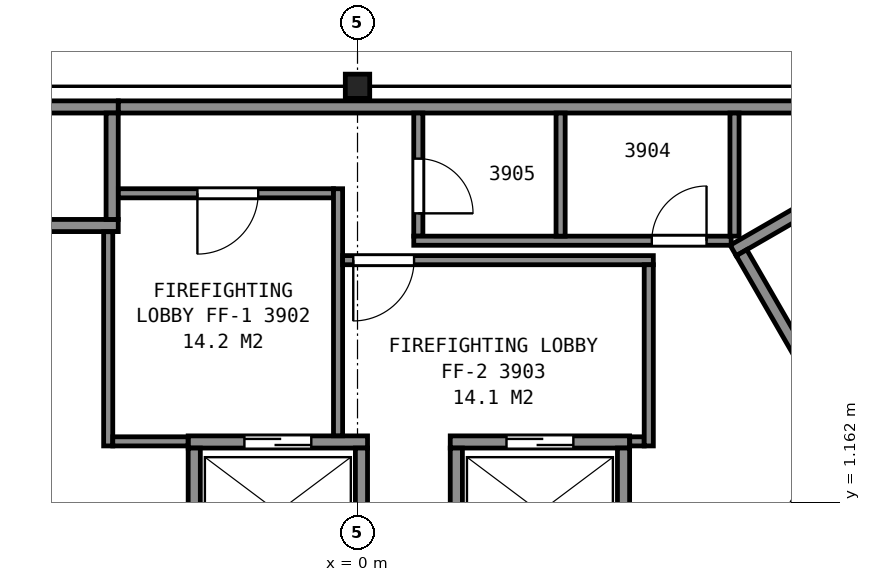
"""IFC4 building model, lengths in metres.
Left out: names, types, materials, properties, quantities, classifications, styles, units other than length and angle.
Written with IfcOpenShell. Run it as: python <this file> out.ifc"""

import sys

from ifc_helpers import new_model, si_unit, direction, frame, frame_2d, origin, origin_2d, place, context, subcontext, project, spatial, rectangle, i_section, extrude, element, fill, save


model = new_model("IFC4")
c1 = context("Model", 3, precision=1e-05, world=origin(), true_north=direction((0.0, 1.0)))
c2 = subcontext(c1, "Body", "Model", "MODEL_VIEW")
j1 = project(units=[si_unit("LENGTHUNIT", "METRE"), si_unit("PLANEANGLEUNIT", "RADIAN")], contexts=[c1])
p1 = place(None, origin())
s1 = spatial("IfcSite", under=j1, at=p1, CompositionType="ELEMENT")
p2 = place(p1, origin())
s2 = spatial("IfcBuilding", under=s1, at=p2, CompositionType="ELEMENT")
p3 = place(p2, frame((0.0, 0.0, 159.9)))
s3 = spatial("IfcBuildingStorey", under=s2, at=p3, CompositionType="ELEMENT", Elevation=159.9)
p4 = place(p3, frame((0.0, 8.0, 0.0), z_axis=(0.0, 0.0, 1.0), x_axis=(1.0, 0.0, 0.0)))
e1 = element("IfcColumn", 1, at=p4, inside=s3, PredefinedType="COLUMN", context=c2, shape_type="SweptSolid", body=[
    extrude(i_section(OverallWidth=0.401, OverallDepth=0.399, WebThickness=0.025, FlangeThickness=0.04, FilletRadius=0.015, at=origin_2d()), origin(), (0.0, 0.0, 1.0), 3.7),
])
p5 = place(p3, frame((6.178, 5.299, 0.0), z_axis=(0.0, 0.0, 1.0), x_axis=(0.866019993635, 0.500009370536, 0.0)))
e2 = element("IfcWall", 2, at=p5, inside=s3, PredefinedType="PARTITIONING", context=c2, shape_type="SweptSolid", body=[
    extrude(rectangle(XDim=9.6, YDim=0.2, at=frame_2d((4.8, 0.0))), origin(), (0.0, 0.0, 1.0), 3.45),
])
p6 = place(p3, frame((7.715, 2.838, 0.0), z_axis=(0.0, 0.0, 1.0), x_axis=(-0.500049511043, 0.865996816683, 0.0)))
e3 = element("IfcWall", 3, at=p6, inside=s3, PredefinedType="PARTITIONING", context=c2, shape_type="SweptSolid", body=[
    extrude(rectangle(XDim=2.8, YDim=0.2, at=frame_2d((1.4, 0.0))), origin(), (0.0, 0.0, 1.0), 3.45),
])
p7 = place(p3, frame((-2.785, 2.15, 0.0), z_axis=(0.0, 0.0, 1.0), x_axis=(1.0, 0.0, 0.0)))
e4 = element("IfcWall", 4, at=p7, inside=s3, PredefinedType="PARTITIONING", context=c2, shape_type="SweptSolid", body=[
    extrude(rectangle(XDim=2.95, YDim=0.2, at=frame_2d((1.475, 0.0))), origin(), (0.0, 0.0, 1.0), 3.7),
])
p8 = place(p7, frame((0.925, 0.0, 0.0)))
e5 = element("IfcOpeningElement", 5, at=p8, cuts=e4, PredefinedType="OPENING", context=c2, shape_type="SweptSolid", body=[
    extrude(rectangle(XDim=1.1, YDim=2.1, at=frame_2d((0.55, 1.05))), frame((0.0, 0.11, 0.0), z_axis=(0.0, -1.0, 0.0), x_axis=(1.0, 0.0, 0.0)), (0.0, 0.0, 1.0), 0.22),
])
p9 = place(p3, frame((1.525, 2.15, 0.0), z_axis=(0.0, 0.0, 1.0), x_axis=(1.0, 0.0, 0.0)))
e6 = element("IfcWall", 6, at=p9, inside=s3, PredefinedType="PARTITIONING", context=c2, shape_type="SweptSolid", body=[
    extrude(rectangle(XDim=2.95, YDim=0.2, at=frame_2d((1.475, 0.0))), origin(), (0.0, 0.0, 1.0), 3.7),
])
p10 = place(p9, frame((0.925, 0.0, 0.0)))
e7 = element("IfcOpeningElement", 7, at=p10, cuts=e6, PredefinedType="OPENING", context=c2, shape_type="SweptSolid", body=[
    extrude(rectangle(XDim=1.1, YDim=2.1, at=frame_2d((0.55, 1.05))), frame((0.0, 0.11, 0.0), z_axis=(0.0, -1.0, 0.0), x_axis=(1.0, 0.0, 0.0)), (0.0, 0.0, 1.0), 0.22),
])
for number, where, z_axis, x_axis in (
    (8, (-6.285, 5.71, 0.0), (0.0, 0.0, 1.0), (1.0, 0.0, 0.0)),
    (9, (-6.285, 7.66, 0.0), (0.0, 0.0, 1.0), (1.0, 0.0, 0.0)),
):
    element("IfcWall", number, at=place(p3, frame(where, z_axis=z_axis, x_axis=x_axis)), inside=s3, PredefinedType="PARTITIONING", context=c2, shape_type="SweptSolid", body=[
        extrude(rectangle(XDim=2.35, YDim=0.2, at=frame_2d((1.175, 0.0))), origin(), (0.0, 0.0, 1.0), 3.7),
    ])
p11 = place(p3, frame((5.663, -1.612, 0.0), z_axis=(0.0, 0.0, 1.0), x_axis=(0.49998122708, 0.866036242063, 0.0)))
e10 = element("IfcWall", 10, at=p11, inside=s3, PredefinedType="PARTITIONING", context=c2, shape_type="SweptSolid", body=[
    extrude(rectangle(XDim=4.9, YDim=0.2, at=frame_2d((2.45, 0.0))), origin(), (0.0, 0.0, 1.0), 3.7),
])
for number, where, z_axis, x_axis in (
    (11, (4.375, 0.1, 0.0), (0.0, 0.0, 1.0), (0.0, 1.0, 0.0)),
    (12, (1.625, 0.1, 0.0), (0.0, 0.0, 1.0), (0.0, 1.0, 0.0)),
    (13, (0.065, 0.1, 0.0), (0.0, 0.0, 1.0), (0.0, 1.0, 0.0)),
    (14, (-2.685, 0.1, 0.0), (0.0, 0.0, 1.0), (0.0, 1.0, 0.0)),
):
    element("IfcWall", number, at=place(p3, frame(where, z_axis=z_axis, x_axis=x_axis)), inside=s3, PredefinedType="PARTITIONING", context=c2, shape_type="SweptSolid", body=[
        extrude(rectangle(XDim=1.95, YDim=0.2, at=frame_2d((0.975, 0.0))), origin(), (0.0, 0.0, 1.0), 3.7),
    ])
p12 = place(p3, frame((-4.035, 5.81, 0.0), z_axis=(0.0, 0.0, 1.0), x_axis=(0.0, 1.0, 0.0)))
e15 = element("IfcWall", 15, at=p12, inside=s3, PredefinedType="PARTITIONING", context=c2, shape_type="SweptSolid", body=[
    extrude(rectangle(XDim=1.75, YDim=0.2, at=frame_2d((0.875, 0.0))), origin(), (0.0, 0.0, 1.0), 3.7),
])
p13 = place(p3, frame((-4.1, 2.085, 0.0), z_axis=(0.0, 0.0, 1.0), x_axis=(0.0, 1.0, 0.0)))
e16 = element("IfcWall", 16, at=p13, inside=s3, PredefinedType="PARTITIONING", context=c2, shape_type="SweptSolid", body=[
    extrude(rectangle(XDim=3.523, YDim=0.15, at=frame_2d((1.761, 0.0))), origin(), (0.0, 0.0, 1.0), 3.45),
])
p14 = place(p3, frame((-4.025, 2.16, 0.0), z_axis=(0.0, 0.0, 1.0), x_axis=(1.0, 0.0, 0.0)))
e17 = element("IfcWall", 17, at=p14, inside=s3, PredefinedType="PARTITIONING", context=c2, shape_type="SweptSolid", body=[
    extrude(rectangle(XDim=1.238, YDim=0.15, at=frame_2d((0.619, 0.0))), origin(), (0.0, 0.0, 1.0), 3.45),
])
p15 = place(p3, frame((-3.933, 6.24, 0.0), z_axis=(0.0, 0.0, 1.0), x_axis=(1.0, 0.0, 0.0)))
e18 = element("IfcWall", 18, at=p15, inside=s3, PredefinedType="PARTITIONING", context=c2, shape_type="SweptSolid", body=[
    extrude(rectangle(XDim=3.538, YDim=0.15, at=frame_2d((1.769, 0.0))), origin(), (0.0, 0.0, 1.0), 3.45),
])
p16 = place(p15, frame((1.3, 0.0, 0.0)))
e19 = element("IfcOpeningElement", 19, at=p16, cuts=e18, PredefinedType="OPENING", context=c2, shape_type="SweptSolid", body=[
    extrude(rectangle(XDim=1.0, YDim=2.1, at=frame_2d((0.5, 1.05))), frame((0.0, 0.085, 0.0), z_axis=(0.0, -1.0, 0.0), x_axis=(1.0, 0.0, 0.0)), (0.0, 0.0, 1.0), 0.17),
])
p17 = place(p3, frame((-3.933, 7.66, 0.0), z_axis=(0.0, 0.0, 1.0), x_axis=(1.0, 0.0, 0.0)))
e20 = element("IfcWall", 20, at=p17, inside=s3, PredefinedType="PARTITIONING", context=c2, shape_type="SweptSolid", body=[
    extrude(rectangle(XDim=13.841, YDim=0.2, at=frame_2d((6.92, 0.0))), origin(), (0.0, 0.0, 1.0), 3.45),
])
p18 = place(p3, frame((-0.32, 2.252, 0.0), z_axis=(0.0, 0.0, 1.0), x_axis=(0.0, 1.0, 0.0)))
e21 = element("IfcWall", 21, at=p18, inside=s3, PredefinedType="PARTITIONING", context=c2, shape_type="SweptSolid", body=[
    extrude(rectangle(XDim=4.063, YDim=0.15, at=frame_2d((2.031, 0.0))), origin(), (0.0, 0.0, 1.0), 3.45),
])
p19 = place(p3, frame((-0.245, 5.14, 0.0), z_axis=(0.0, 0.0, 1.0), x_axis=(1.0, 0.0, 0.0)))
e22 = element("IfcWall", 22, at=p19, inside=s3, PredefinedType="PARTITIONING", context=c2, shape_type="SweptSolid", body=[
    extrude(rectangle(XDim=5.11, YDim=0.15, at=frame_2d((2.555, 0.0))), origin(), (0.0, 0.0, 1.0), 3.45),
])
p20 = place(p19, frame((0.175, 0.0, 0.0)))
e23 = element("IfcOpeningElement", 23, at=p20, cuts=e22, PredefinedType="OPENING", context=c2, shape_type="SweptSolid", body=[
    extrude(rectangle(XDim=1.0, YDim=2.1, at=frame_2d((0.5, 1.05))), frame((0.0, 0.085, 0.0), z_axis=(0.0, -1.0, 0.0), x_axis=(1.0, 0.0, 0.0)), (0.0, 0.0, 1.0), 0.17),
])
p21 = place(p3, frame((1.0, 7.56, 0.0), z_axis=(0.0, 0.0, 1.0), x_axis=(0.0, -1.0, 0.0)))
e24 = element("IfcWall", 24, at=p21, inside=s3, PredefinedType="PARTITIONING", context=c2, shape_type="SweptSolid", body=[
    extrude(rectangle(XDim=2.025, YDim=0.15, at=frame_2d((1.013, 0.0))), origin(), (0.0, 0.0, 1.0), 3.45),
])
p22 = place(p21, frame((0.75, 0.0, 0.0)))
e25 = element("IfcOpeningElement", 25, at=p22, cuts=e24, PredefinedType="OPENING", context=c2, shape_type="SweptSolid", body=[
    extrude(rectangle(XDim=0.9, YDim=2.1, at=frame_2d((0.45, 1.05))), frame((0.0, 0.085, 0.0), z_axis=(0.0, -1.0, 0.0), x_axis=(1.0, 0.0, 0.0)), (0.0, 0.0, 1.0), 0.17),
])
p23 = place(p3, frame((0.925, 5.46, 0.0), z_axis=(0.0, 0.0, 1.0), x_axis=(1.0, 0.0, 0.0)))
e26 = element("IfcWall", 26, at=p23, inside=s3, PredefinedType="PARTITIONING", context=c2, shape_type="SweptSolid", body=[
    extrude(rectangle(XDim=5.22, YDim=0.15, at=frame_2d((2.61, 0.0))), origin(), (0.0, 0.0, 1.0), 3.45),
])
p24 = place(p23, frame((3.915, 0.0, 0.0)))
e27 = element("IfcOpeningElement", 27, at=p24, cuts=e26, PredefinedType="OPENING", context=c2, shape_type="SweptSolid", body=[
    extrude(rectangle(XDim=0.9, YDim=2.1, at=frame_2d((0.45, 1.05))), frame((0.0, 0.085, 0.0), z_axis=(0.0, -1.0, 0.0), x_axis=(1.0, 0.0, 0.0)), (0.0, 0.0, 1.0), 0.17),
])
p25 = place(p3, frame((3.34, 5.535, 0.0), z_axis=(0.0, 0.0, 1.0), x_axis=(0.0, 1.0, 0.0)))
e28 = element("IfcWall", 28, at=p25, inside=s3, PredefinedType="PARTITIONING", context=c2, shape_type="SweptSolid", body=[
    extrude(rectangle(XDim=2.025, YDim=0.15, at=frame_2d((1.013, 0.0))), origin(), (0.0, 0.0, 1.0), 3.45),
])
p26 = place(p3, frame((4.477, 2.16, 0.0), z_axis=(0.0, 0.0, 1.0), x_axis=(1.0, 0.0, 0.0)))
e29 = element("IfcWall", 29, at=p26, inside=s3, PredefinedType="PARTITIONING", context=c2, shape_type="SweptSolid", body=[
    extrude(rectangle(XDim=0.238, YDim=0.15, at=frame_2d((0.119, 0.0))), origin(), (0.0, 0.0, 1.0), 3.45),
])
p27 = place(p3, frame((4.79, 2.085, 0.0), z_axis=(0.0, 0.0, 1.0), x_axis=(0.0, 1.0, 0.0)))
e30 = element("IfcWall", 30, at=p27, inside=s3, PredefinedType="PARTITIONING", context=c2, shape_type="SweptSolid", body=[
    extrude(rectangle(XDim=2.98, YDim=0.15, at=frame_2d((1.49, 0.0))), origin(), (0.0, 0.0, 1.0), 3.45),
])
p28 = place(p3, frame((6.2, 5.535, 0.0), z_axis=(0.0, 0.0, 1.0), x_axis=(0.0, 1.0, 0.0)))
e31 = element("IfcWall", 31, at=p28, inside=s3, PredefinedType="PARTITIONING", context=c2, shape_type="SweptSolid", body=[
    extrude(rectangle(XDim=2.025, YDim=0.15, at=frame_2d((1.013, 0.0))), origin(), (0.0, 0.0, 1.0), 3.45),
])
p29 = place(p3, frame((-4.675, -12.706, 0.0), z_axis=(0.0, 0.0, 1.0), x_axis=(-0.499972470324, 0.866041297467, 0.0)))
e32 = element("IfcWall", 32, at=p29, inside=s3, PredefinedType="PARTITIONING", context=c2, shape_type="SweptSolid", body=[
    extrude(rectangle(XDim=17.385, YDim=0.2, at=frame_2d((8.692, 0.0))), origin(), (0.0, 0.0, 1.0), 2.713),
])
p30 = place(p29, frame((15.435, 0.0, 0.0)))
e33 = element("IfcOpeningElement", 33, at=p30, cuts=e32, PredefinedType="OPENING", context=c2, shape_type="SweptSolid", body=[
    extrude(rectangle(XDim=0.9, YDim=2.1, at=frame_2d((0.45, 1.05))), frame((0.0, 0.11, 0.0), z_axis=(0.0, -1.0, 0.0), x_axis=(1.0, 0.0, 0.0)), (0.0, 0.0, 1.0), 0.22),
])
p31 = place(p29, frame((12.835, 0.0, 0.0)))
e34 = element("IfcOpeningElement", 34, at=p31, cuts=e32, PredefinedType="OPENING", context=c2, shape_type="SweptSolid", body=[
    extrude(rectangle(XDim=0.9, YDim=2.1, at=frame_2d((0.45, 1.05))), frame((0.0, 0.11, 0.0), z_axis=(0.0, -1.0, 0.0), x_axis=(1.0, 0.0, 0.0)), (0.0, 0.0, 1.0), 0.22),
])
p32 = place(p29, frame((6.941, 0.0, 0.0)))
e35 = element("IfcOpeningElement", 35, at=p32, cuts=e32, PredefinedType="OPENING", context=c2, shape_type="SweptSolid", body=[
    extrude(rectangle(XDim=0.9, YDim=2.1, at=frame_2d((0.45, 1.05))), frame((0.0, 0.11, 0.0), z_axis=(0.0, -1.0, 0.0), x_axis=(1.0, 0.0, 0.0)), (0.0, 0.0, 1.0), 0.22),
])
p33 = place(p29, frame((2.028, 0.0, 0.0)))
e36 = element("IfcOpeningElement", 36, at=p33, cuts=e32, PredefinedType="OPENING", context=c2, shape_type="SweptSolid", body=[
    extrude(rectangle(XDim=0.9, YDim=2.1, at=frame_2d((0.45, 1.05))), frame((0.0, 0.11, 0.0), z_axis=(0.0, -1.0, 0.0), x_axis=(1.0, 0.0, 0.0)), (0.0, 0.0, 1.0), 0.22),
])
p34 = place(p3, frame((13.342, 2.306, 0.0), z_axis=(0.0, 0.0, 1.0), x_axis=(-0.49997635812, -0.866039053, 0.0)))
e37 = element("IfcWall", 37, at=p34, inside=s3, PredefinedType="PARTITIONING", context=c2, shape_type="SweptSolid", body=[
    extrude(rectangle(XDim=17.285, YDim=0.1, at=frame_2d((8.643, 0.0))), origin(), (0.0, 0.0, 1.0), 2.713),
])
p35 = place(p34, frame((15.585, 0.0, 0.0)))
e38 = element("IfcOpeningElement", 38, at=p35, cuts=e37, PredefinedType="OPENING", context=c2, shape_type="SweptSolid", body=[
    extrude(rectangle(XDim=0.9, YDim=2.1, at=frame_2d((0.45, 1.05))), frame((0.0, 0.06, 0.0), z_axis=(0.0, -1.0, 0.0), x_axis=(1.0, 0.0, 0.0)), (0.0, 0.0, 1.0), 0.12),
])
p36 = place(p34, frame((11.595, 0.0, 0.0)))
e39 = element("IfcOpeningElement", 39, at=p36, cuts=e37, PredefinedType="OPENING", context=c2, shape_type="SweptSolid", body=[
    extrude(rectangle(XDim=0.9, YDim=2.1, at=frame_2d((0.45, 1.05))), frame((0.0, 0.06, 0.0), z_axis=(0.0, -1.0, 0.0), x_axis=(1.0, 0.0, 0.0)), (0.0, 0.0, 1.0), 0.12),
])
p37 = place(p34, frame((6.171, 0.0, 0.0)))
e40 = element("IfcOpeningElement", 40, at=p37, cuts=e37, PredefinedType="OPENING", context=c2, shape_type="SweptSolid", body=[
    extrude(rectangle(XDim=0.9, YDim=2.1, at=frame_2d((0.45, 1.05))), frame((0.0, 0.06, 0.0), z_axis=(0.0, -1.0, 0.0), x_axis=(1.0, 0.0, 0.0)), (0.0, 0.0, 1.0), 0.12),
])
p38 = place(p8, origin())
e41 = element("IfcDoor", 41, at=p38, inside=s3, OperationType="SLIDING_TO_LEFT", PredefinedType="DOOR", context=c2, shape_type="SweptSolid", body=[
    extrude(rectangle(XDim=1.1, YDim=2.1, at=frame_2d((0.55, 1.05))), frame((0.0, 0.025, 0.0), z_axis=(0.0, -1.0, 0.0), x_axis=(1.0, 0.0, 0.0)), (0.0, 0.0, 1.0), 0.05),
])
fill(e5, e41)
p39 = place(p10, origin())
e42 = element("IfcDoor", 42, at=p39, inside=s3, OperationType="SLIDING_TO_RIGHT", PredefinedType="DOOR", context=c2, shape_type="SweptSolid", body=[
    extrude(rectangle(XDim=1.1, YDim=2.1, at=frame_2d((0.55, 1.05))), frame((0.0, 0.025, 0.0), z_axis=(0.0, -1.0, 0.0), x_axis=(1.0, 0.0, 0.0)), (0.0, 0.0, 1.0), 0.05),
])
fill(e7, e42)
p40 = place(p16, origin())
e43 = element("IfcDoor", 43, at=p40, inside=s3, OperationType="SINGLE_SWING_LEFT", PredefinedType="DOOR", context=c2, shape_type="SweptSolid", body=[
    extrude(rectangle(XDim=1.0, YDim=2.1, at=frame_2d((0.5, 1.05))), frame((0.0, 0.025, 0.0), z_axis=(0.0, -1.0, 0.0), x_axis=(1.0, 0.0, 0.0)), (0.0, 0.0, 1.0), 0.05),
])
fill(e19, e43)
p41 = place(p20, origin())
e44 = element("IfcDoor", 44, at=p41, inside=s3, OperationType="SINGLE_SWING_LEFT", PredefinedType="DOOR", context=c2, shape_type="SweptSolid", body=[
    extrude(rectangle(XDim=1.0, YDim=2.1, at=frame_2d((0.5, 1.05))), frame((0.0, 0.025, 0.0), z_axis=(0.0, -1.0, 0.0), x_axis=(1.0, 0.0, 0.0)), (0.0, 0.0, 1.0), 0.05),
])
fill(e23, e44)
p42 = place(p22, origin())
e45 = element("IfcDoor", 45, at=p42, inside=s3, OperationType="SINGLE_SWING_RIGHT", PredefinedType="DOOR", context=c2, shape_type="SweptSolid", body=[
    extrude(rectangle(XDim=0.9, YDim=2.1, at=frame_2d((0.45, 1.05))), frame((0.0, 0.025, 0.0), z_axis=(0.0, -1.0, 0.0), x_axis=(1.0, 0.0, 0.0)), (0.0, 0.0, 1.0), 0.05),
])
fill(e25, e45)
p43 = place(p24, origin())
e46 = element("IfcDoor", 46, at=p43, inside=s3, OperationType="SINGLE_SWING_RIGHT", PredefinedType="DOOR", context=c2, shape_type="SweptSolid", body=[
    extrude(rectangle(XDim=0.9, YDim=2.1, at=frame_2d((0.45, 1.05))), frame((0.0, 0.025, 0.0), z_axis=(0.0, -1.0, 0.0), x_axis=(1.0, 0.0, 0.0)), (0.0, 0.0, 1.0), 0.05),
])
fill(e27, e46)
save(model, sys.argv[1])
